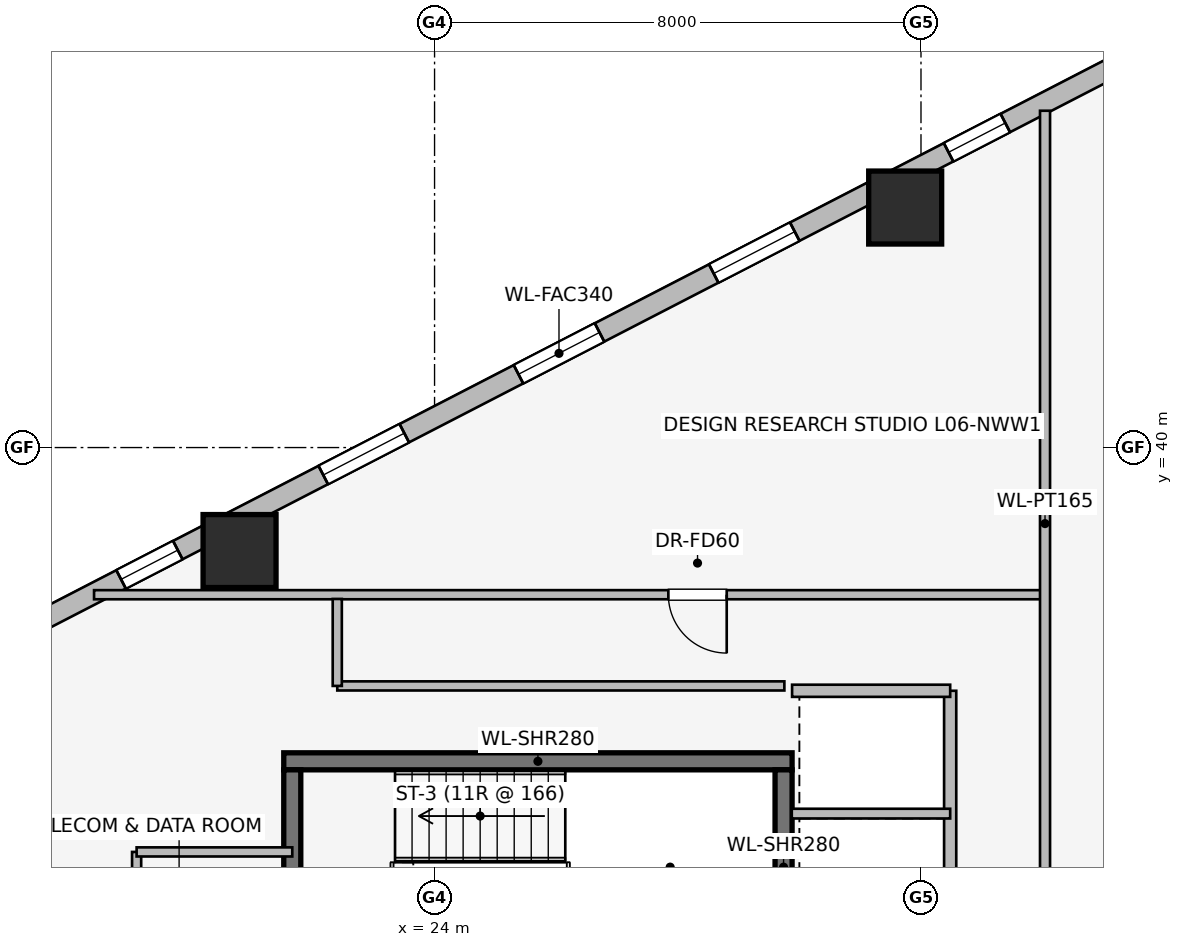
"""IFC4 building model, lengths in metres.
Left out: names, types, materials, properties, quantities, classifications, styles, units other than length and angle.
Written with IfcOpenShell. Run it as: python <this file> out.ifc"""

import sys

from ifc_helpers import new_model, si_unit, direction, frame, frame_2d, origin, origin_2d, place, context, subcontext, project, spatial, rectangle, extrude, element, fill, save


model = new_model("IFC4")
c1 = context("Model", 3, precision=1e-05, world=origin(), true_north=direction((0.0, 1.0)))
c2 = subcontext(c1, "Body", "Model", "MODEL_VIEW")
j1 = project(units=[si_unit("LENGTHUNIT", "METRE"), si_unit("PLANEANGLEUNIT", "RADIAN")], contexts=[c1])
p1 = place(None, origin())
s1 = spatial("IfcSite", under=j1, at=p1, CompositionType="ELEMENT")
p2 = place(p1, origin())
s2 = spatial("IfcBuilding", under=s1, at=p2, CompositionType="ELEMENT")
p3 = place(p2, frame((0.0, 0.0, 27.0)))
s3 = spatial("IfcBuildingStorey", under=s2, at=p3, CompositionType="ELEMENT", Elevation=27.0)
p4 = place(p3, frame((29.88, 34.84, 0.0), z_axis=(0.0, 0.0, 1.0), x_axis=(-1.0, 0.0, 0.0)))
e1 = element("IfcWall", 1, at=p4, inside=s3, PredefinedType="SHEAR", context=c2, shape_type="SweptSolid", body=[
    extrude(rectangle(XDim=8.36, YDim=0.28, at=frame_2d((4.18, 0.0))), origin(), (0.0, 0.0, 1.0), 3.65),
])
for number, where, z_axis, x_axis in (
    (2, (21.66, 34.7, 0.0), (0.0, 0.0, 1.0), (0.0, -1.0, 0.0)),
    (3, (29.74, 31.5, 0.0), (0.0, 0.0, 1.0), (0.0, 1.0, 0.0)),
):
    element("IfcWall", number, at=place(p3, frame(where, z_axis=z_axis, x_axis=x_axis)), inside=s3, PredefinedType="SHEAR", context=c2, shape_type="SweptSolid", body=[
        extrude(rectangle(XDim=3.2, YDim=0.28, at=frame_2d((1.6, 0.0))), origin(), (0.0, 0.0, 1.0), 3.65),
    ])
for number, where, z_axis, x_axis in (
    (4, (31.74, 43.947, -0.42), (0.0, 0.0, 1.0), (1.0, 0.0, 0.0)),
    (5, (20.793, 38.298, -0.42), (0.0, 0.0, 1.0), (1.0, 0.0, 0.0)),
):
    element("IfcColumn", number, at=place(p3, frame(where, z_axis=z_axis, x_axis=x_axis)), inside=s3, PredefinedType="COLUMN", context=c2, shape_type="SweptSolid", body=[
        extrude(rectangle(XDim=1.2, YDim=1.2, at=origin_2d()), origin(), (0.0, 0.0, 1.0), 4.07),
    ])
p5 = place(p3, frame((16.924, 36.841, 0.0), z_axis=(0.0, 0.0, 1.0), x_axis=(0.888634413993, 0.458616264721, 0.0)))
e6 = element("IfcWall", 6, at=p5, inside=s3, PredefinedType="STANDARD", context=c2, shape_type="SweptSolid", body=[
    extrude(rectangle(XDim=20.531, YDim=0.34, at=frame_2d((10.266, 0.0))), origin(), (0.0, 0.0, 1.0), 2.684),
])
p6 = place(p5, frame((2.161, 0.0, 0.75)))
e7 = element("IfcOpeningElement", 7, at=p6, cuts=e6, PredefinedType="OPENING", context=c2, shape_type="SweptSolid", body=[
    extrude(rectangle(XDim=1.05, YDim=1.4, at=frame_2d((0.525, 0.7))), frame((0.0, 0.18, 0.0), z_axis=(0.0, -1.0, 0.0), x_axis=(1.0, 0.0, 0.0)), (0.0, 0.0, 1.0), 0.36),
])
p7 = place(p5, frame((5.903, 0.0, 0.75)))
e8 = element("IfcOpeningElement", 8, at=p7, cuts=e6, PredefinedType="OPENING", context=c2, shape_type="SweptSolid", body=[
    extrude(rectangle(XDim=1.5, YDim=1.5, at=frame_2d((0.75, 0.75))), frame((0.0, 0.18, 0.0), z_axis=(0.0, -1.0, 0.0), x_axis=(1.0, 0.0, 0.0)), (0.0, 0.0, 1.0), 0.36),
])
p8 = place(p5, frame((9.516, 0.0, 0.75)))
e9 = element("IfcOpeningElement", 9, at=p8, cuts=e6, PredefinedType="OPENING", context=c2, shape_type="SweptSolid", body=[
    extrude(rectangle(XDim=1.5, YDim=1.5, at=frame_2d((0.75, 0.75))), frame((0.0, 0.18, 0.0), z_axis=(0.0, -1.0, 0.0), x_axis=(1.0, 0.0, 0.0)), (0.0, 0.0, 1.0), 0.36),
])
p9 = place(p5, frame((13.129, 0.0, 0.75)))
e10 = element("IfcOpeningElement", 10, at=p9, cuts=e6, PredefinedType="OPENING", context=c2, shape_type="SweptSolid", body=[
    extrude(rectangle(XDim=1.5, YDim=1.5, at=frame_2d((0.75, 0.75))), frame((0.0, 0.18, 0.0), z_axis=(0.0, -1.0, 0.0), x_axis=(1.0, 0.0, 0.0)), (0.0, 0.0, 1.0), 0.36),
])
p10 = place(p5, frame((17.476, 0.0, 0.75)))
e11 = element("IfcOpeningElement", 11, at=p10, cuts=e6, PredefinedType="OPENING", context=c2, shape_type="SweptSolid", body=[
    extrude(rectangle(XDim=1.05, YDim=1.4, at=frame_2d((0.525, 0.7))), frame((0.0, 0.18, 0.0), z_axis=(0.0, -1.0, 0.0), x_axis=(1.0, 0.0, 0.0)), (0.0, 0.0, 1.0), 0.36),
])
p11 = place(p3, frame((32.48, 31.95, 0.0), z_axis=(0.0, 0.0, 1.0), x_axis=(0.0, 1.0, 0.0)))
e12 = element("IfcWall", 12, at=p11, inside=s3, PredefinedType="PARTITIONING", context=c2, shape_type="SweptSolid", body=[
    extrude(rectangle(XDim=4.05, YDim=0.2, at=frame_2d((2.025, 0.0))), origin(), (0.0, 0.0, 1.0), 2.513),
])
p12 = place(p3, frame((29.88, 36.0, 0.0), z_axis=(0.0, 0.0, 1.0), x_axis=(1.0, 0.0, 0.0)))
e13 = element("IfcWall", 13, at=p12, inside=s3, PredefinedType="PARTITIONING", context=c2, shape_type="SweptSolid", body=[
    extrude(rectangle(XDim=2.6, YDim=0.2, at=frame_2d((1.3, 0.0))), origin(), (0.0, 0.0, 1.0), 3.39),
])
p13 = place(p3, frame((29.875, 33.98, 0.0), z_axis=(0.0, 0.0, 1.0), x_axis=(1.0, 0.0, 0.0)))
e14 = element("IfcWall", 14, at=p13, inside=s3, PredefinedType="PARTITIONING", context=c2, shape_type="SweptSolid", body=[
    extrude(rectangle(XDim=2.605, YDim=0.16, at=frame_2d((1.302, 0.0))), origin(), (0.0, 0.0, 1.0), 3.39),
])
p14 = place(p3, frame((19.1, 33.35, 0.0), z_axis=(0.0, 0.0, 1.0), x_axis=(0.0, -1.0, 0.0)))
e15 = element("IfcWall", 15, at=p14, inside=s3, PredefinedType="PARTITIONING", context=c2, shape_type="SweptSolid", body=[
    extrude(rectangle(XDim=2.655, YDim=0.15, at=frame_2d((1.328, 0.0))), origin(), (0.0, 0.0, 1.0), 3.39),
])
p15 = place(p3, frame((21.66, 33.35, 0.0), z_axis=(0.0, 0.0, 1.0), x_axis=(-1.0, 0.0, 0.0)))
e16 = element("IfcWall", 16, at=p15, inside=s3, PredefinedType="PARTITIONING", context=c2, shape_type="SweptSolid", body=[
    extrude(rectangle(XDim=2.56, YDim=0.15, at=frame_2d((1.28, 0.0))), origin(), (0.0, 0.0, 1.0), 3.39),
])
p16 = place(p3, frame((34.0, 37.58, 0.0), z_axis=(0.0, 0.0, 1.0), x_axis=(-1.0, 0.0, 0.0)))
e17 = element("IfcWall", 17, at=p16, inside=s3, PredefinedType="PARTITIONING", context=c2, shape_type="SweptSolid", body=[
    extrude(rectangle(XDim=15.6, YDim=0.15, at=frame_2d((7.8, 0.0))), origin(), (0.0, 0.0, 1.0), 3.39),
])
p17 = place(p16, frame((5.195, 0.0, 0.0)))
e18 = element("IfcOpeningElement", 18, at=p17, cuts=e17, PredefinedType="OPENING", context=c2, shape_type="SweptSolid", body=[
    extrude(rectangle(XDim=0.96, YDim=2.0, at=frame_2d((0.48, 1.0))), frame((0.0, 0.085, 0.0), z_axis=(0.0, -1.0, 0.0), x_axis=(1.0, 0.0, 0.0)), (0.0, 0.0, 1.0), 0.17),
])
p18 = place(p3, frame((34.04, 31.96, 0.0), z_axis=(0.0, 0.0, 1.0), x_axis=(0.0, 1.0, 0.0)))
e19 = element("IfcWall", 19, at=p18, inside=s3, PredefinedType="PARTITIONING", context=c2, shape_type="SweptSolid", body=[
    extrude(rectangle(XDim=13.579, YDim=0.165, at=frame_2d((6.79, 0.0))), origin(), (0.0, 0.0, 1.0), 3.39),
])
p19 = place(p3, frame((29.753, 36.08, 0.0), z_axis=(0.0, 0.0, 1.0), x_axis=(-1.0, 0.0, 0.0)))
e20 = element("IfcWall", 20, at=p19, inside=s3, PredefinedType="PARTITIONING", context=c2, shape_type="SweptSolid", body=[
    extrude(rectangle(XDim=7.353, YDim=0.15, at=frame_2d((3.677, 0.0))), origin(), (0.0, 0.0, 1.0), 3.39),
])
p20 = place(p3, frame((22.4, 36.08, 0.0), z_axis=(0.0, 0.0, 1.0), x_axis=(0.0, 1.0, 0.0)))
e21 = element("IfcWall", 21, at=p20, inside=s3, PredefinedType="PARTITIONING", context=c2, shape_type="SweptSolid", body=[
    extrude(rectangle(XDim=1.43, YDim=0.15, at=frame_2d((0.715, 0.0))), origin(), (0.0, 0.0, 1.0), 3.39),
])
p21 = place(p6, origin())
e22 = element("IfcWindow", 22, at=p21, inside=s3, PartitioningType="SINGLE_PANEL", PredefinedType="WINDOW", context=c2, shape_type="SweptSolid", body=[
    extrude(rectangle(XDim=1.05, YDim=1.4, at=frame_2d((0.525, 0.7))), frame((0.0, 0.03, 0.0), z_axis=(0.0, -1.0, 0.0), x_axis=(1.0, 0.0, 0.0)), (0.0, 0.0, 1.0), 0.06),
])
fill(e7, e22)
p22 = place(p7, origin())
e23 = element("IfcWindow", 23, at=p22, inside=s3, PartitioningType="SINGLE_PANEL", PredefinedType="WINDOW", context=c2, shape_type="SweptSolid", body=[
    extrude(rectangle(XDim=1.5, YDim=1.5, at=frame_2d((0.75, 0.75))), frame((0.0, 0.03, 0.0), z_axis=(0.0, -1.0, 0.0), x_axis=(1.0, 0.0, 0.0)), (0.0, 0.0, 1.0), 0.06),
])
fill(e8, e23)
p23 = place(p8, origin())
e24 = element("IfcWindow", 24, at=p23, inside=s3, PartitioningType="SINGLE_PANEL", PredefinedType="WINDOW", context=c2, shape_type="SweptSolid", body=[
    extrude(rectangle(XDim=1.5, YDim=1.5, at=frame_2d((0.75, 0.75))), frame((0.0, 0.03, 0.0), z_axis=(0.0, -1.0, 0.0), x_axis=(1.0, 0.0, 0.0)), (0.0, 0.0, 1.0), 0.06),
])
fill(e9, e24)
p24 = place(p9, origin())
e25 = element("IfcWindow", 25, at=p24, inside=s3, PartitioningType="SINGLE_PANEL", PredefinedType="WINDOW", context=c2, shape_type="SweptSolid", body=[
    extrude(rectangle(XDim=1.5, YDim=1.5, at=frame_2d((0.75, 0.75))), frame((0.0, 0.03, 0.0), z_axis=(0.0, -1.0, 0.0), x_axis=(1.0, 0.0, 0.0)), (0.0, 0.0, 1.0), 0.06),
])
fill(e10, e25)
p25 = place(p10, origin())
e26 = element("IfcWindow", 26, at=p25, inside=s3, PartitioningType="SINGLE_PANEL", PredefinedType="WINDOW", context=c2, shape_type="SweptSolid", body=[
    extrude(rectangle(XDim=1.05, YDim=1.4, at=frame_2d((0.525, 0.7))), frame((0.0, 0.03, 0.0), z_axis=(0.0, -1.0, 0.0), x_axis=(1.0, 0.0, 0.0)), (0.0, 0.0, 1.0), 0.06),
])
fill(e11, e26)
p26 = place(p17, origin())
e27 = element("IfcDoor", 27, at=p26, inside=s3, OperationType="SINGLE_SWING_LEFT", PredefinedType="DOOR", context=c2, shape_type="SweptSolid", body=[
    extrude(rectangle(XDim=0.96, YDim=2.0, at=frame_2d((0.48, 1.0))), frame((0.0, 0.025, 0.0), z_axis=(0.0, -1.0, 0.0), x_axis=(1.0, 0.0, 0.0)), (0.0, 0.0, 1.0), 0.05),
])
fill(e18, e27)
save(model, sys.argv[1])
